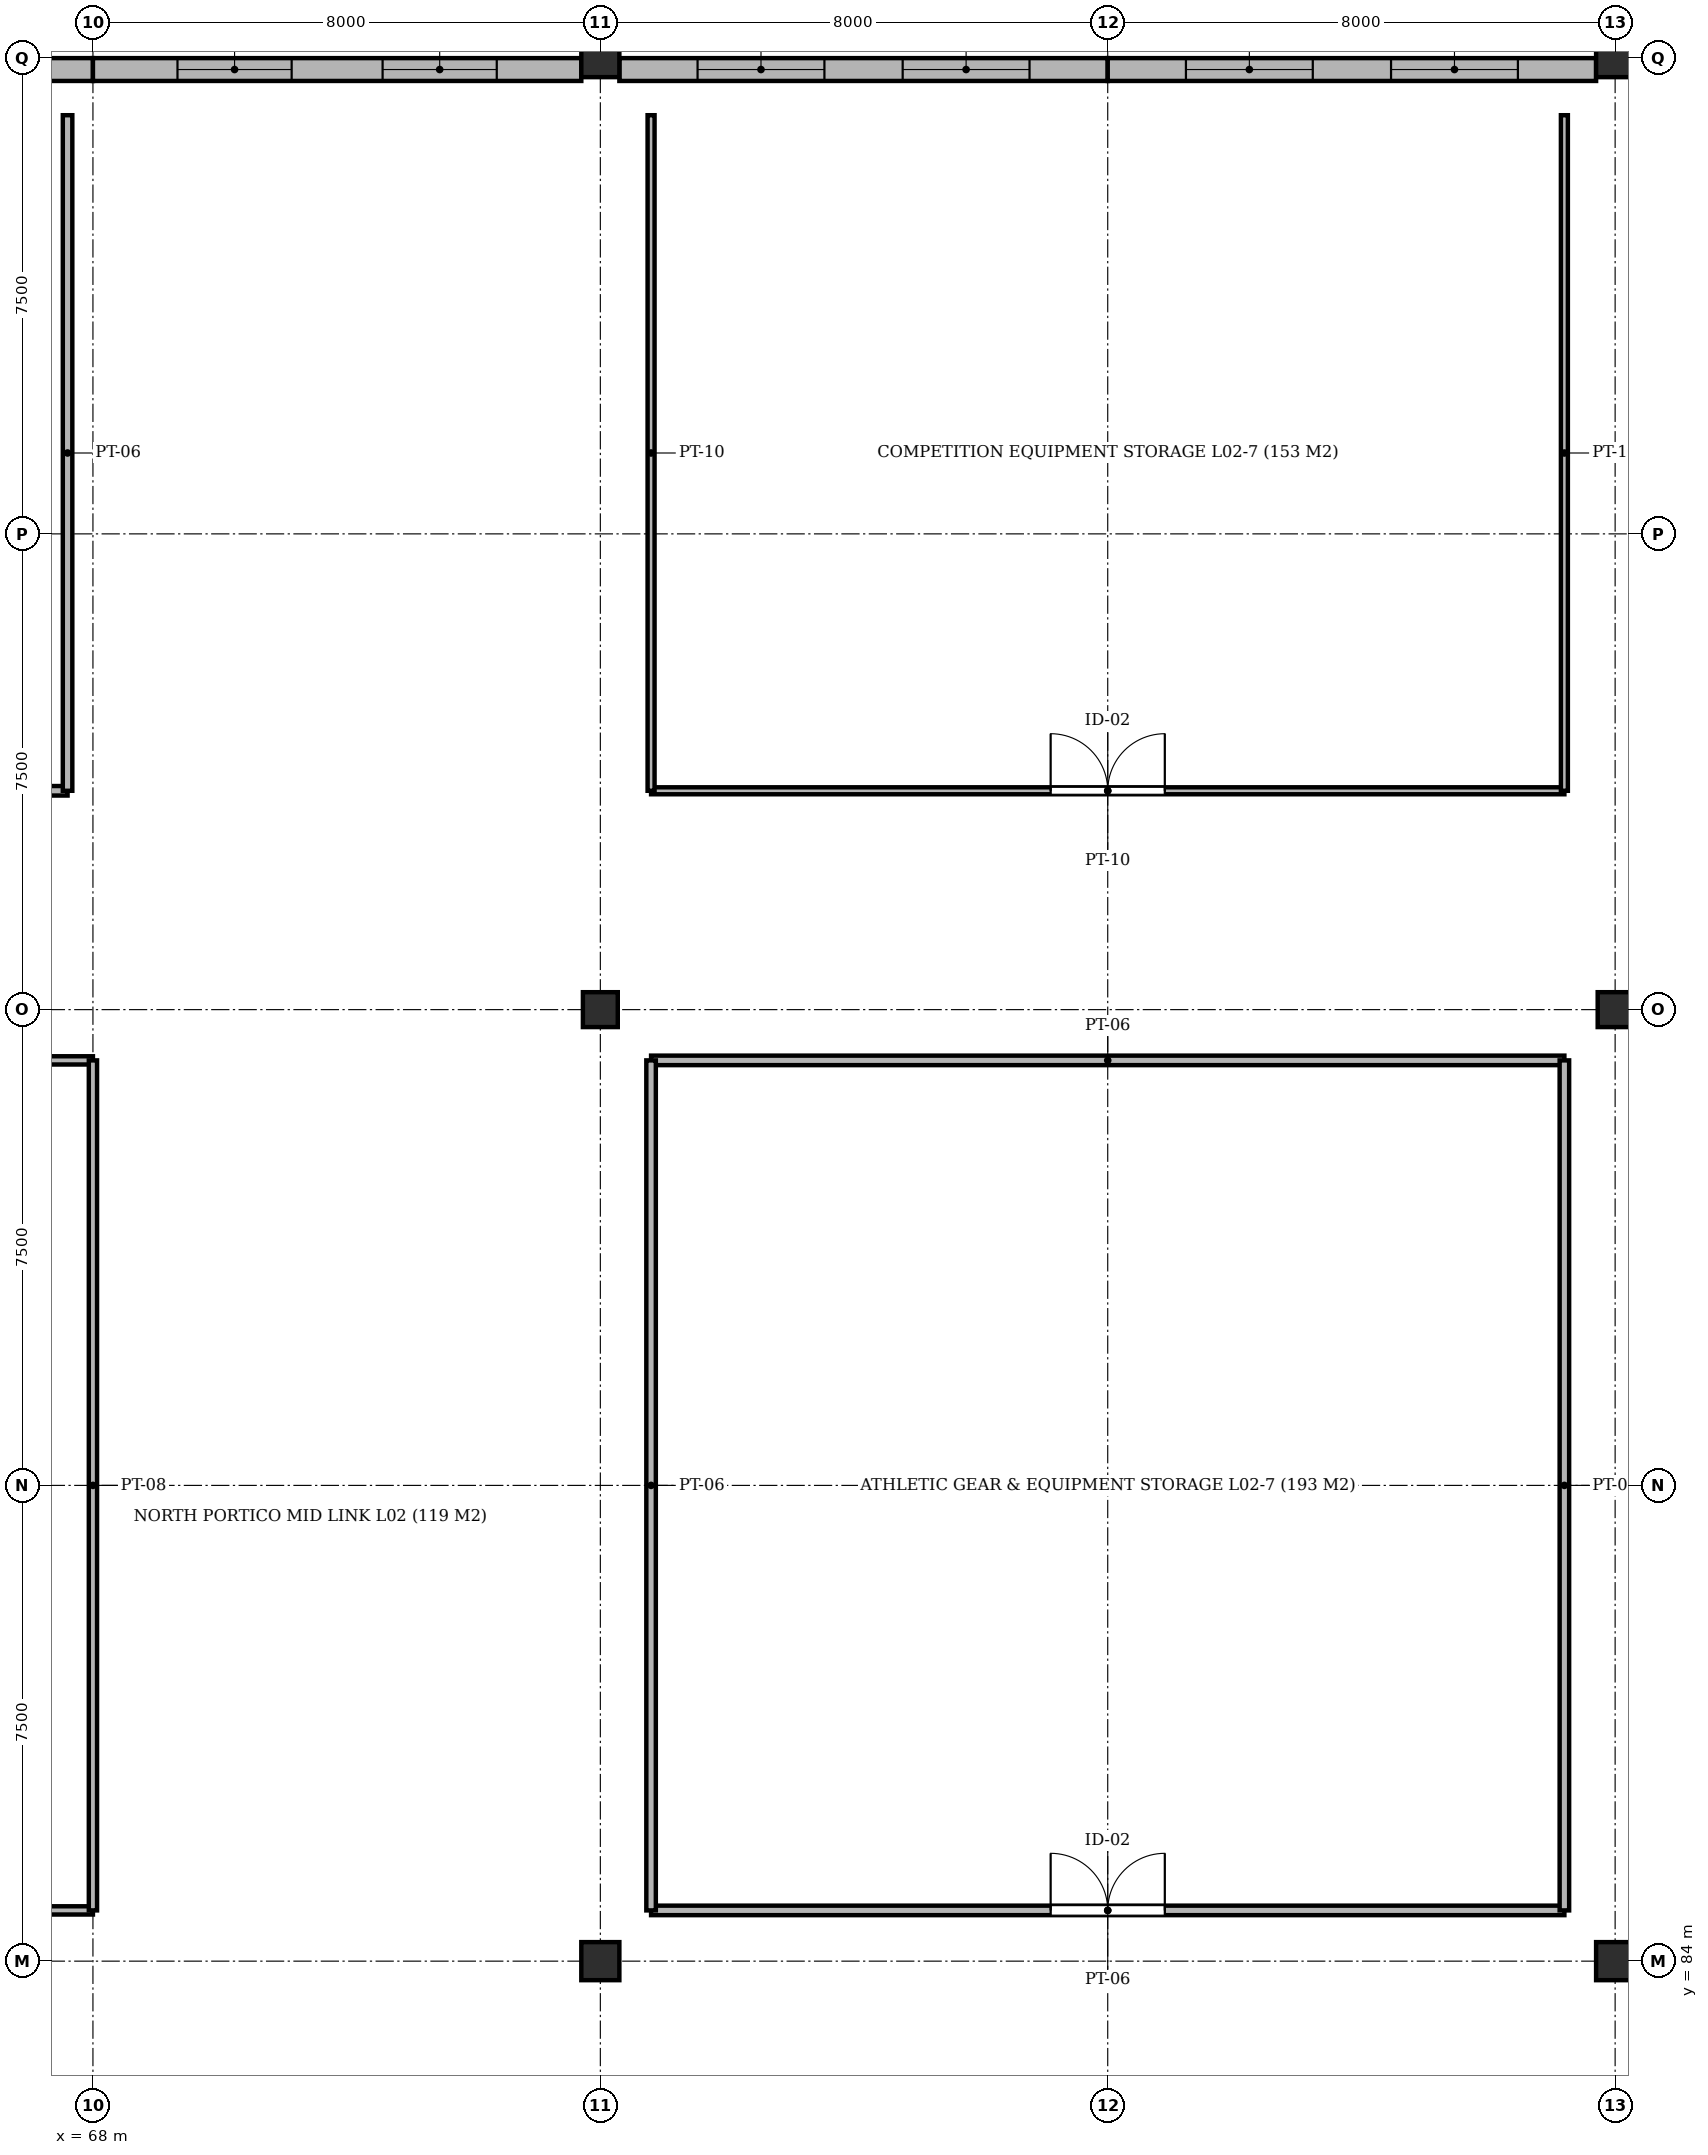
"""IFC4 building model, lengths in metres.
Left out: names, types, materials, properties, quantities, classifications, styles, units other than length and angle.
Written with IfcOpenShell. Run it as: python <this file> out.ifc"""

import sys

from ifc_helpers import new_model, si_unit, direction, frame, frame_2d, origin, origin_2d, place, context, subcontext, project, spatial, rectangle, extrude, element, fill, save


model = new_model("IFC4")
c1 = context("Model", 3, precision=1e-05, world=origin(), true_north=direction((0.0, 1.0)))
c2 = subcontext(c1, "Body", "Model", "MODEL_VIEW")
j1 = project(units=[si_unit("LENGTHUNIT", "METRE"), si_unit("PLANEANGLEUNIT", "RADIAN")], contexts=[c1])
p1 = place(None, origin())
s1 = spatial("IfcSite", under=j1, at=p1, CompositionType="ELEMENT")
p2 = place(p1, origin())
s2 = spatial("IfcBuilding", under=s1, at=p2, CompositionType="ELEMENT")
p3 = place(p2, frame((0.0, 0.0, 9.4)))
s3 = spatial("IfcBuildingStorey", under=s2, at=p3, CompositionType="ELEMENT", Elevation=9.4)
p4 = place(p3, frame((76.0, 84.0, -0.45), z_axis=(0.0, 0.0, 1.0), x_axis=(1.0, 0.0, 0.0)))
e1 = element("IfcColumn", 1, at=p4, inside=s3, PredefinedType="COLUMN", context=c2, shape_type="SweptSolid", body=[
    extrude(rectangle(XDim=0.6, YDim=0.6, at=origin_2d()), origin(), (0.0, 0.0, 1.0), 4.77),
])
p5 = place(p3, frame((76.0, 99.0, -0.45), z_axis=(0.0, 0.0, 1.0), x_axis=(1.0, 0.0, 0.0)))
e2 = element("IfcColumn", 2, at=p5, inside=s3, PredefinedType="COLUMN", context=c2, shape_type="SweptSolid", body=[
    extrude(rectangle(XDim=0.55, YDim=0.55, at=origin_2d()), origin(), (0.0, 0.0, 1.0), 4.77),
])
for number, where, z_axis, x_axis in (
    (3, (76.0, 114.0, -0.45), (0.0, 0.0, 1.0), (1.0, 0.0, 0.0)),
    (4, (92.0, 84.0, -0.45), (0.0, 0.0, 1.0), (1.0, 0.0, 0.0)),
):
    element("IfcColumn", number, at=place(p3, frame(where, z_axis=z_axis, x_axis=x_axis)), inside=s3, PredefinedType="COLUMN", context=c2, shape_type="SweptSolid", body=[
        extrude(rectangle(XDim=0.6, YDim=0.6, at=origin_2d()), origin(), (0.0, 0.0, 1.0), 4.77),
    ])
p6 = place(p3, frame((92.0, 99.0, -0.45), z_axis=(0.0, 0.0, 1.0), x_axis=(1.0, 0.0, 0.0)))
e5 = element("IfcColumn", 5, at=p6, inside=s3, PredefinedType="COLUMN", context=c2, shape_type="SweptSolid", body=[
    extrude(rectangle(XDim=0.55, YDim=0.55, at=origin_2d()), origin(), (0.0, 0.0, 1.0), 4.77),
])
p7 = place(p3, frame((92.0, 114.0, -0.45), z_axis=(0.0, 0.0, 1.0), x_axis=(1.0, 0.0, 0.0)))
e6 = element("IfcColumn", 6, at=p7, inside=s3, PredefinedType="COLUMN", context=c2, shape_type="SweptSolid", body=[
    extrude(rectangle(XDim=0.6, YDim=0.6, at=origin_2d()), origin(), (0.0, 0.0, 1.0), 4.77),
])
p8 = place(p3, frame((68.0, 113.82, 0.0), z_axis=(0.0, 0.0, 1.0), x_axis=(-1.0, 0.0, 0.0)))
e7 = element("IfcWall", 7, at=p8, inside=s3, PredefinedType="SOLIDWALL", context=c2, shape_type="SweptSolid", body=[
    extrude(rectangle(XDim=7.7, YDim=0.36, at=frame_2d((3.85, 0.0))), origin(), (0.0, 0.0, 1.0), 3.45),
])
p9 = place(p8, frame((4.467, 0.0, 0.92)))
e8 = element("IfcOpeningElement", 8, at=p9, cuts=e7, PredefinedType="OPENING", context=c2, shape_type="SweptSolid", body=[
    extrude(rectangle(XDim=2.0, YDim=2.1, at=frame_2d((1.0, 1.05))), frame((0.0, 0.192, 0.0), z_axis=(0.0, -1.0, 0.0), x_axis=(1.0, 0.0, 0.0)), (0.0, 0.0, 1.0), 0.384),
])
p10 = place(p8, frame((1.233, 0.0, 0.92)))
e9 = element("IfcOpeningElement", 9, at=p10, cuts=e7, PredefinedType="OPENING", context=c2, shape_type="SweptSolid", body=[
    extrude(rectangle(XDim=2.0, YDim=2.1, at=frame_2d((1.0, 1.05))), frame((0.0, 0.192, 0.0), z_axis=(0.0, -1.0, 0.0), x_axis=(1.0, 0.0, 0.0)), (0.0, 0.0, 1.0), 0.384),
])
p11 = place(p3, frame((75.7, 113.82, 0.0), z_axis=(0.0, 0.0, 1.0), x_axis=(-1.0, 0.0, 0.0)))
e10 = element("IfcWall", 10, at=p11, inside=s3, PredefinedType="SOLIDWALL", context=c2, shape_type="SweptSolid", body=[
    extrude(rectangle(XDim=7.7, YDim=0.36, at=frame_2d((3.85, 0.0))), origin(), (0.0, 0.0, 1.0), 3.45),
])
p12 = place(p11, frame((4.567, 0.0, 0.92)))
e11 = element("IfcOpeningElement", 11, at=p12, cuts=e10, PredefinedType="OPENING", context=c2, shape_type="SweptSolid", body=[
    extrude(rectangle(XDim=1.8, YDim=2.1, at=frame_2d((0.9, 1.05))), frame((0.0, 0.192, 0.0), z_axis=(0.0, -1.0, 0.0), x_axis=(1.0, 0.0, 0.0)), (0.0, 0.0, 1.0), 0.384),
])
p13 = place(p11, frame((1.333, 0.0, 0.92)))
e12 = element("IfcOpeningElement", 12, at=p13, cuts=e10, PredefinedType="OPENING", context=c2, shape_type="SweptSolid", body=[
    extrude(rectangle(XDim=1.8, YDim=2.1, at=frame_2d((0.9, 1.05))), frame((0.0, 0.192, 0.0), z_axis=(0.0, -1.0, 0.0), x_axis=(1.0, 0.0, 0.0)), (0.0, 0.0, 1.0), 0.384),
])
p14 = place(p3, frame((84.0, 113.82, 0.0), z_axis=(0.0, 0.0, 1.0), x_axis=(-1.0, 0.0, 0.0)))
e13 = element("IfcWall", 13, at=p14, inside=s3, PredefinedType="SOLIDWALL", context=c2, shape_type="SweptSolid", body=[
    extrude(rectangle(XDim=7.7, YDim=0.36, at=frame_2d((3.85, 0.0))), origin(), (0.0, 0.0, 1.0), 3.45),
])
p15 = place(p14, frame((4.467, 0.0, 0.92)))
e14 = element("IfcOpeningElement", 14, at=p15, cuts=e13, PredefinedType="OPENING", context=c2, shape_type="SweptSolid", body=[
    extrude(rectangle(XDim=2.0, YDim=2.1, at=frame_2d((1.0, 1.05))), frame((0.0, 0.192, 0.0), z_axis=(0.0, -1.0, 0.0), x_axis=(1.0, 0.0, 0.0)), (0.0, 0.0, 1.0), 0.384),
])
p16 = place(p14, frame((1.233, 0.0, 0.92)))
e15 = element("IfcOpeningElement", 15, at=p16, cuts=e13, PredefinedType="OPENING", context=c2, shape_type="SweptSolid", body=[
    extrude(rectangle(XDim=2.0, YDim=2.1, at=frame_2d((1.0, 1.05))), frame((0.0, 0.192, 0.0), z_axis=(0.0, -1.0, 0.0), x_axis=(1.0, 0.0, 0.0)), (0.0, 0.0, 1.0), 0.384),
])
p17 = place(p3, frame((91.7, 113.82, 0.0), z_axis=(0.0, 0.0, 1.0), x_axis=(-1.0, 0.0, 0.0)))
e16 = element("IfcWall", 16, at=p17, inside=s3, PredefinedType="SOLIDWALL", context=c2, shape_type="SweptSolid", body=[
    extrude(rectangle(XDim=7.7, YDim=0.36, at=frame_2d((3.85, 0.0))), origin(), (0.0, 0.0, 1.0), 3.45),
])
p18 = place(p17, frame((4.467, 0.0, 0.92)))
e17 = element("IfcOpeningElement", 17, at=p18, cuts=e16, PredefinedType="OPENING", context=c2, shape_type="SweptSolid", body=[
    extrude(rectangle(XDim=2.0, YDim=2.1, at=frame_2d((1.0, 1.05))), frame((0.0, 0.192, 0.0), z_axis=(0.0, -1.0, 0.0), x_axis=(1.0, 0.0, 0.0)), (0.0, 0.0, 1.0), 0.384),
])
p19 = place(p17, frame((1.233, 0.0, 0.92)))
e18 = element("IfcOpeningElement", 18, at=p19, cuts=e16, PredefinedType="OPENING", context=c2, shape_type="SweptSolid", body=[
    extrude(rectangle(XDim=2.0, YDim=2.1, at=frame_2d((1.0, 1.05))), frame((0.0, 0.192, 0.0), z_axis=(0.0, -1.0, 0.0), x_axis=(1.0, 0.0, 0.0)), (0.0, 0.0, 1.0), 0.384),
])
p20 = place(p3, frame((60.8, 84.8, 0.0), z_axis=(0.0, 0.0, 1.0), x_axis=(1.0, 0.0, 0.0)))
e19 = element("IfcWall", 19, at=p20, inside=s3, PredefinedType="PARTITIONING", context=c2, shape_type="SweptSolid", body=[
    extrude(rectangle(XDim=7.2, YDim=0.13, at=frame_2d((3.6, 0.0))), origin(), (0.0, 0.0, 1.0), 3.88),
])
p21 = place(p20, frame((3.075, 0.0, 0.0)))
e20 = element("IfcOpeningElement", 20, at=p21, cuts=e19, PredefinedType="OPENING", context=c2, shape_type="SweptSolid", body=[
    extrude(rectangle(XDim=1.05, YDim=2.15, at=frame_2d((0.525, 1.075))), frame((0.0, 0.077, 0.0), z_axis=(0.0, -1.0, 0.0), x_axis=(1.0, 0.0, 0.0)), (0.0, 0.0, 1.0), 0.154),
])
p22 = place(p3, frame((60.8, 98.2, 0.0), z_axis=(0.0, 0.0, 1.0), x_axis=(1.0, 0.0, 0.0)))
e21 = element("IfcWall", 21, at=p22, inside=s3, PredefinedType="PARTITIONING", context=c2, shape_type="SweptSolid", body=[
    extrude(rectangle(XDim=7.2, YDim=0.13, at=frame_2d((3.6, 0.0))), origin(), (0.0, 0.0, 1.0), 3.88),
])
p23 = place(p3, frame((68.0, 84.8, 0.0), z_axis=(0.0, 0.0, 1.0), x_axis=(0.0, 1.0, 0.0)))
e22 = element("IfcWall", 22, at=p23, inside=s3, PredefinedType="PARTITIONING", context=c2, shape_type="SweptSolid", body=[
    extrude(rectangle(XDim=13.4, YDim=0.13, at=frame_2d((6.7, 0.0))), origin(), (0.0, 0.0, 1.0), 3.88),
])
p24 = place(p3, frame((76.8, 84.8, 0.0), z_axis=(0.0, 0.0, 1.0), x_axis=(1.0, 0.0, 0.0)))
e23 = element("IfcWall", 23, at=p24, inside=s3, PredefinedType="PARTITIONING", context=c2, shape_type="SweptSolid", body=[
    extrude(rectangle(XDim=14.4, YDim=0.15, at=frame_2d((7.2, 0.0))), origin(), (0.0, 0.0, 1.0), 3.88),
])
p25 = place(p24, frame((6.3, 0.0, 0.0)))
e24 = element("IfcOpeningElement", 24, at=p25, cuts=e23, PredefinedType="OPENING", context=c2, shape_type="SweptSolid", body=[
    extrude(rectangle(XDim=1.8, YDim=2.25, at=frame_2d((0.9, 1.125))), frame((0.0, 0.087, 0.0), z_axis=(0.0, -1.0, 0.0), x_axis=(1.0, 0.0, 0.0)), (0.0, 0.0, 1.0), 0.174),
])
p26 = place(p3, frame((76.8, 98.2, 0.0), z_axis=(0.0, 0.0, 1.0), x_axis=(1.0, 0.0, 0.0)))
e25 = element("IfcWall", 25, at=p26, inside=s3, PredefinedType="PARTITIONING", context=c2, shape_type="SweptSolid", body=[
    extrude(rectangle(XDim=14.4, YDim=0.15, at=frame_2d((7.2, 0.0))), origin(), (0.0, 0.0, 1.0), 3.88),
])
for number, where, z_axis, x_axis in (
    (26, (76.8, 84.8, 0.0), (0.0, 0.0, 1.0), (0.0, 1.0, 0.0)),
    (27, (91.2, 84.8, 0.0), (0.0, 0.0, 1.0), (0.0, 1.0, 0.0)),
):
    element("IfcWall", number, at=place(p3, frame(where, z_axis=z_axis, x_axis=x_axis)), inside=s3, PredefinedType="PARTITIONING", context=c2, shape_type="SweptSolid", body=[
        extrude(rectangle(XDim=13.4, YDim=0.15, at=frame_2d((6.7, 0.0))), origin(), (0.0, 0.0, 1.0), 3.88),
    ])
p27 = place(p3, frame((60.8, 102.45, 0.0), z_axis=(0.0, 0.0, 1.0), x_axis=(1.0, 0.0, 0.0)))
e28 = element("IfcWall", 28, at=p27, inside=s3, PredefinedType="PARTITIONING", context=c2, shape_type="SweptSolid", body=[
    extrude(rectangle(XDim=6.8, YDim=0.15, at=frame_2d((3.4, 0.0))), origin(), (0.0, 0.0, 1.0), 3.88),
])
p28 = place(p27, frame((2.875, 0.0, 0.0)))
e29 = element("IfcOpeningElement", 29, at=p28, cuts=e28, PredefinedType="OPENING", context=c2, shape_type="SweptSolid", body=[
    extrude(rectangle(XDim=1.05, YDim=2.15, at=frame_2d((0.525, 1.075))), frame((0.0, 0.087, 0.0), z_axis=(0.0, -1.0, 0.0), x_axis=(1.0, 0.0, 0.0)), (0.0, 0.0, 1.0), 0.174),
])
p29 = place(p3, frame((67.6, 102.45, 0.0), z_axis=(0.0, 0.0, 1.0), x_axis=(0.0, 1.0, 0.0)))
e30 = element("IfcWall", 30, at=p29, inside=s3, PredefinedType="PARTITIONING", context=c2, shape_type="SweptSolid", body=[
    extrude(rectangle(XDim=10.65, YDim=0.15, at=frame_2d((5.325, 0.0))), origin(), (0.0, 0.0, 1.0), 3.88),
])
p30 = place(p3, frame((76.8, 102.45, 0.0), z_axis=(0.0, 0.0, 1.0), x_axis=(1.0, 0.0, 0.0)))
e31 = element("IfcWall", 31, at=p30, inside=s3, PredefinedType="PARTITIONING", context=c2, shape_type="SweptSolid", body=[
    extrude(rectangle(XDim=14.4, YDim=0.11, at=frame_2d((7.2, 0.0))), origin(), (0.0, 0.0, 1.0), 3.88),
])
p31 = place(p30, frame((6.3, 0.0, 0.0)))
e32 = element("IfcOpeningElement", 32, at=p31, cuts=e31, PredefinedType="OPENING", context=c2, shape_type="SweptSolid", body=[
    extrude(rectangle(XDim=1.8, YDim=2.25, at=frame_2d((0.9, 1.125))), frame((0.0, 0.067, 0.0), z_axis=(0.0, -1.0, 0.0), x_axis=(1.0, 0.0, 0.0)), (0.0, 0.0, 1.0), 0.134),
])
for number, where, z_axis, x_axis in (
    (33, (76.8, 102.45, 0.0), (0.0, 0.0, 1.0), (0.0, 1.0, 0.0)),
    (34, (91.2, 102.45, 0.0), (0.0, 0.0, 1.0), (0.0, 1.0, 0.0)),
):
    element("IfcWall", number, at=place(p3, frame(where, z_axis=z_axis, x_axis=x_axis)), inside=s3, PredefinedType="PARTITIONING", context=c2, shape_type="SweptSolid", body=[
        extrude(rectangle(XDim=10.65, YDim=0.11, at=frame_2d((5.325, 0.0))), origin(), (0.0, 0.0, 1.0), 3.88),
    ])
p32 = place(p12, origin())
e35 = element("IfcWindow", 35, at=p32, inside=s3, PartitioningType="SINGLE_PANEL", PredefinedType="WINDOW", context=c2, shape_type="SweptSolid", body=[
    extrude(rectangle(XDim=1.8, YDim=2.1, at=frame_2d((0.9, 1.05))), frame((0.0, 0.03, 0.0), z_axis=(0.0, -1.0, 0.0), x_axis=(1.0, 0.0, 0.0)), (0.0, 0.0, 1.0), 0.06),
])
fill(e11, e35)
p33 = place(p13, origin())
e36 = element("IfcWindow", 36, at=p33, inside=s3, PartitioningType="SINGLE_PANEL", PredefinedType="WINDOW", context=c2, shape_type="SweptSolid", body=[
    extrude(rectangle(XDim=1.8, YDim=2.1, at=frame_2d((0.9, 1.05))), frame((0.0, 0.03, 0.0), z_axis=(0.0, -1.0, 0.0), x_axis=(1.0, 0.0, 0.0)), (0.0, 0.0, 1.0), 0.06),
])
fill(e12, e36)
p34 = place(p15, origin())
e37 = element("IfcWindow", 37, at=p34, inside=s3, PartitioningType="SINGLE_PANEL", PredefinedType="WINDOW", context=c2, shape_type="SweptSolid", body=[
    extrude(rectangle(XDim=2.0, YDim=2.1, at=frame_2d((1.0, 1.05))), frame((0.0, 0.03, 0.0), z_axis=(0.0, -1.0, 0.0), x_axis=(1.0, 0.0, 0.0)), (0.0, 0.0, 1.0), 0.06),
])
fill(e14, e37)
p35 = place(p16, origin())
e38 = element("IfcWindow", 38, at=p35, inside=s3, PartitioningType="SINGLE_PANEL", PredefinedType="WINDOW", context=c2, shape_type="SweptSolid", body=[
    extrude(rectangle(XDim=2.0, YDim=2.1, at=frame_2d((1.0, 1.05))), frame((0.0, 0.03, 0.0), z_axis=(0.0, -1.0, 0.0), x_axis=(1.0, 0.0, 0.0)), (0.0, 0.0, 1.0), 0.06),
])
fill(e15, e38)
p36 = place(p18, origin())
e39 = element("IfcWindow", 39, at=p36, inside=s3, PartitioningType="SINGLE_PANEL", PredefinedType="WINDOW", context=c2, shape_type="SweptSolid", body=[
    extrude(rectangle(XDim=2.0, YDim=2.1, at=frame_2d((1.0, 1.05))), frame((0.0, 0.03, 0.0), z_axis=(0.0, -1.0, 0.0), x_axis=(1.0, 0.0, 0.0)), (0.0, 0.0, 1.0), 0.06),
])
fill(e17, e39)
p37 = place(p19, origin())
e40 = element("IfcWindow", 40, at=p37, inside=s3, PartitioningType="SINGLE_PANEL", PredefinedType="WINDOW", context=c2, shape_type="SweptSolid", body=[
    extrude(rectangle(XDim=2.0, YDim=2.1, at=frame_2d((1.0, 1.05))), frame((0.0, 0.03, 0.0), z_axis=(0.0, -1.0, 0.0), x_axis=(1.0, 0.0, 0.0)), (0.0, 0.0, 1.0), 0.06),
])
fill(e18, e40)
p38 = place(p25, origin())
e41 = element("IfcDoor", 41, at=p38, inside=s3, OperationType="DOUBLE_DOOR_SINGLE_SWING", PredefinedType="DOOR", context=c2, shape_type="SweptSolid", body=[
    extrude(rectangle(XDim=1.8, YDim=2.25, at=frame_2d((0.9, 1.125))), frame((0.0, 0.025, 0.0), z_axis=(0.0, -1.0, 0.0), x_axis=(1.0, 0.0, 0.0)), (0.0, 0.0, 1.0), 0.05),
])
fill(e24, e41)
p39 = place(p31, origin())
e42 = element("IfcDoor", 42, at=p39, inside=s3, OperationType="DOUBLE_DOOR_SINGLE_SWING", PredefinedType="DOOR", context=c2, shape_type="SweptSolid", body=[
    extrude(rectangle(XDim=1.8, YDim=2.25, at=frame_2d((0.9, 1.125))), frame((0.0, 0.025, 0.0), z_axis=(0.0, -1.0, 0.0), x_axis=(1.0, 0.0, 0.0)), (0.0, 0.0, 1.0), 0.05),
])
fill(e32, e42)
save(model, sys.argv[1])
